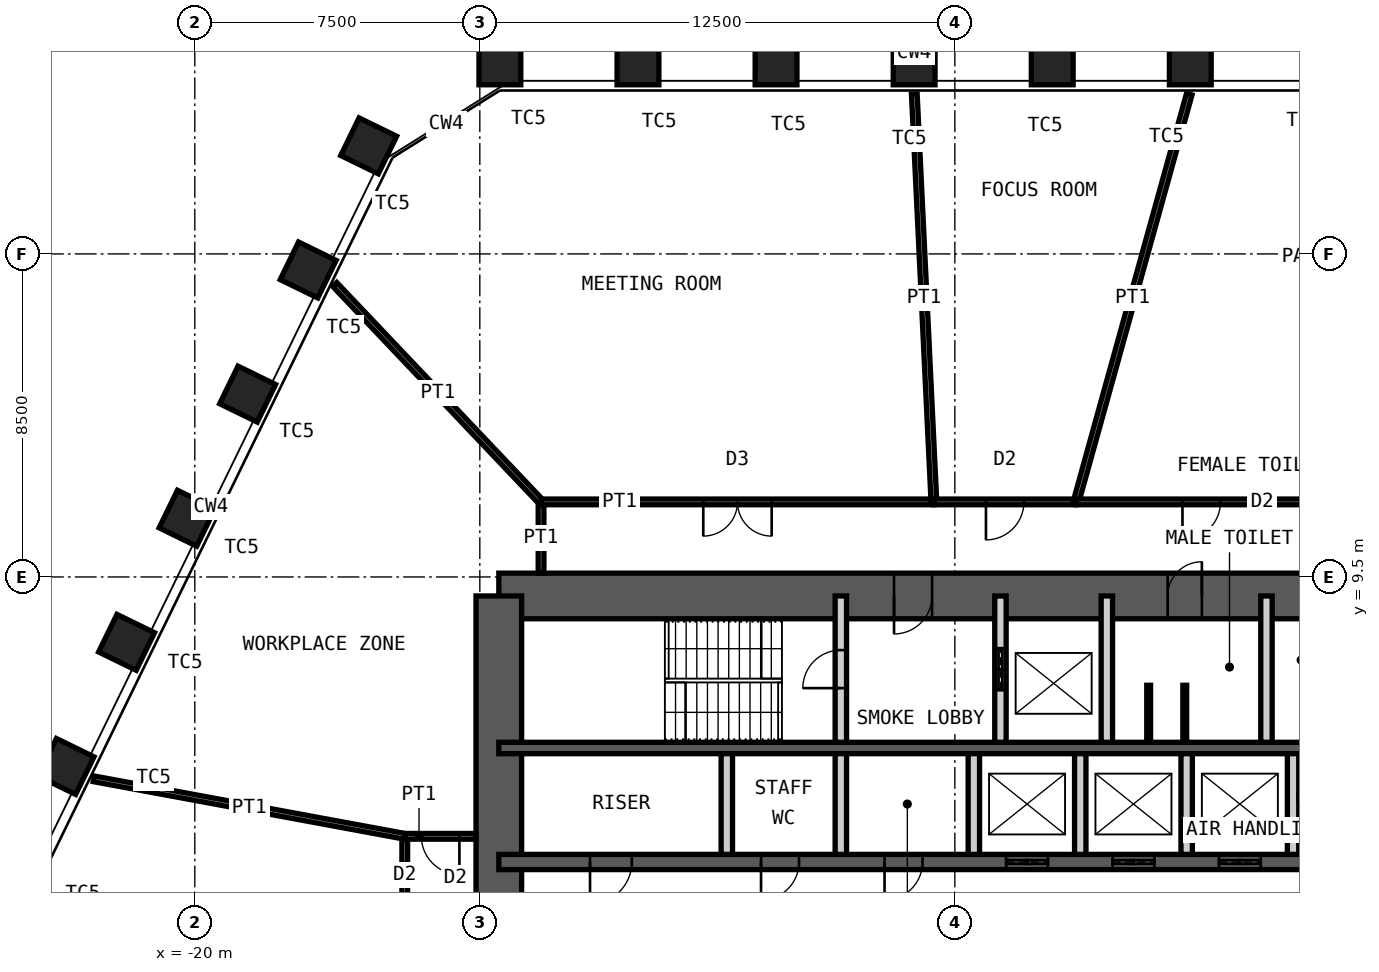
"""IFC4 building model, lengths in metres.
Left out: names, types, materials, properties, quantities, classifications, styles, units other than length and angle.
Written with IfcOpenShell. Run it as: python <this file> out.ifc"""

import sys

from ifc_helpers import new_model, si_unit, direction, frame, frame_2d, origin, origin_2d, place, context, subcontext, project, spatial, rectangle, hollow_rectangle, extrude, element, fill, save


model = new_model("IFC4")
c1 = context("Model", 3, precision=1e-05, world=origin(), true_north=direction((0.0, 1.0)))
c2 = subcontext(c1, "Body", "Model", "MODEL_VIEW")
j1 = project(units=[si_unit("LENGTHUNIT", "METRE"), si_unit("PLANEANGLEUNIT", "RADIAN")], contexts=[c1])
p1 = place(None, origin())
s1 = spatial("IfcSite", under=j1, at=p1, CompositionType="ELEMENT")
p2 = place(p1, origin())
s2 = spatial("IfcBuilding", under=s1, at=p2, CompositionType="ELEMENT")
p3 = place(p2, frame((0.0, 0.0, 205.6)))
s3 = spatial("IfcBuildingStorey", under=s2, at=p3, CompositionType="ELEMENT", Elevation=205.6)
for number, where, z_axis, x_axis in (
    (1, (-11.972, 23.0, 0.0), (0.0, 0.0, 1.0), (-1.0, 0.0, 0.0)),
    (2, (-8.338, 23.0, 0.0), (0.0, 0.0, 1.0), (-1.0, 0.0, 0.0)),
    (3, (-4.705, 23.0, 0.0), (0.0, 0.0, 1.0), (-1.0, 0.0, 0.0)),
    (4, (-1.071, 23.0, 0.0), (0.0, 0.0, 1.0), (-1.0, 0.0, 0.0)),
    (5, (2.562, 23.0, 0.0), (0.0, 0.0, 1.0), (-1.0, 0.0, 0.0)),
    (6, (6.196, 23.0, 0.0), (0.0, 0.0, 1.0), (-1.0, 0.0, 0.0)),
    (7, (-23.388, 4.514, 0.0), (0.0, 0.0, 1.0), (-0.438, -0.899, 0.0)),
    (8, (-21.795, 7.78, 0.0), (0.0, 0.0, 1.0), (-0.438, -0.899, 0.0)),
    (9, (-20.203, 11.045, 0.0), (0.0, 0.0, 1.0), (-0.438, -0.899, 0.0)),
    (10, (-18.61, 14.311, 0.0), (0.0, 0.0, 1.0), (-0.438, -0.899, 0.0)),
    (11, (-17.017, 17.577, 0.0), (0.0, 0.0, 1.0), (-0.438, -0.899, 0.0)),
    (12, (-15.424, 20.843, 0.0), (0.0, 0.0, 1.0), (-0.438, -0.899, 0.0)),
):
    element("IfcColumn", number, at=place(p3, frame(where, z_axis=z_axis, x_axis=x_axis)), inside=s3, PredefinedType="COLUMN", context=c2, shape_type="SweptSolid", body=[
        extrude(hollow_rectangle(XDim=1.1, YDim=1.1, WallThickness=0.07, at=origin_2d()), origin(), (0.0, 0.0, 1.0), 4.2),
    ])
p4 = place(p3, frame((-12.0, 9.0, 0.0), z_axis=(0.0, 0.0, 1.0), x_axis=(1.0, 0.0, 0.0)))
e13 = element("IfcWall", 13, at=p4, inside=s3, PredefinedType="SHEAR", context=c2, shape_type="SweptSolid", body=[
    extrude(rectangle(XDim=24.0, YDim=1.2, at=frame_2d((12.0, 0.0))), origin(), (0.0, 0.0, 1.0), 4.2),
])
p5 = place(p4, frame((10.4, 0.0, 0.0)))
e14 = element("IfcOpeningElement", 14, at=p5, cuts=e13, PredefinedType="OPENING", context=c2, shape_type="SweptSolid", body=[
    extrude(rectangle(XDim=1.0, YDim=2.1, at=frame_2d((0.5, 1.05))), frame((0.0, 0.61, 0.0), z_axis=(0.0, -1.0, 0.0), x_axis=(1.0, 0.0, 0.0)), (0.0, 0.0, 1.0), 1.22),
])
p6 = place(p4, frame((17.6, 0.0, 0.0)))
e15 = element("IfcOpeningElement", 15, at=p6, cuts=e13, PredefinedType="OPENING", context=c2, shape_type="SweptSolid", body=[
    extrude(rectangle(XDim=0.9, YDim=2.1, at=frame_2d((0.45, 1.05))), frame((0.0, 0.61, 0.0), z_axis=(0.0, -1.0, 0.0), x_axis=(1.0, 0.0, 0.0)), (0.0, 0.0, 1.0), 1.22),
])
p7 = place(p4, frame((21.9, 0.0, 0.0)))
e16 = element("IfcOpeningElement", 16, at=p7, cuts=e13, PredefinedType="OPENING", context=c2, shape_type="SweptSolid", body=[
    extrude(rectangle(XDim=0.9, YDim=2.1, at=frame_2d((0.45, 1.05))), frame((0.0, 0.61, 0.0), z_axis=(0.0, -1.0, 0.0), x_axis=(1.0, 0.0, 0.0)), (0.0, 0.0, 1.0), 1.22),
])
p8 = place(p3, frame((-12.0, -9.0, 0.0), z_axis=(0.0, 0.0, 1.0), x_axis=(0.0, 1.0, 0.0)))
e17 = element("IfcWall", 17, at=p8, inside=s3, PredefinedType="SHEAR", context=c2, shape_type="SweptSolid", body=[
    extrude(rectangle(XDim=18.0, YDim=1.2, at=frame_2d((9.0, 0.0))), origin(), (0.0, 0.0, 1.0), 4.2),
])
p9 = place(p8, frame((8.1, 0.0, 0.0)))
e18 = element("IfcOpeningElement", 18, at=p9, cuts=e17, PredefinedType="OPENING", context=c2, shape_type="SweptSolid", body=[
    extrude(rectangle(XDim=1.8, YDim=2.1, at=frame_2d((0.9, 1.05))), frame((0.0, 0.61, 0.0), z_axis=(0.0, -1.0, 0.0), x_axis=(1.0, 0.0, 0.0)), (0.0, 0.0, 1.0), 1.22),
])
p10 = place(p3, frame((-12.0, 5.0, 0.0), z_axis=(0.0, 0.0, 1.0), x_axis=(1.0, 0.0, 0.0)))
e19 = element("IfcWall", 19, at=p10, inside=s3, PredefinedType="SHEAR", context=c2, shape_type="SweptSolid", body=[
    extrude(rectangle(XDim=24.0, YDim=0.3, at=frame_2d((12.0, 0.0))), origin(), (0.0, 0.0, 1.0), 4.2),
])
p11 = place(p3, frame((-12.0, 2.0, 0.0), z_axis=(0.0, 0.0, 1.0), x_axis=(1.0, 0.0, 0.0)))
e20 = element("IfcWall", 20, at=p11, inside=s3, PredefinedType="SHEAR", context=c2, shape_type="SweptSolid", body=[
    extrude(rectangle(XDim=24.0, YDim=0.4, at=frame_2d((12.0, 0.0))), origin(), (0.0, 0.0, 1.0), 4.2),
])
p12 = place(p11, frame((2.4, 0.0, 0.0)))
e21 = element("IfcOpeningElement", 21, at=p12, cuts=e20, PredefinedType="OPENING", context=c2, shape_type="SweptSolid", body=[
    extrude(rectangle(XDim=1.1, YDim=2.1, at=frame_2d((0.55, 1.05))), frame((0.0, 0.21, 0.0), z_axis=(0.0, -1.0, 0.0), x_axis=(1.0, 0.0, 0.0)), (0.0, 0.0, 1.0), 0.42),
])
p13 = place(p11, frame((22.0, 0.0, 0.0)))
e22 = element("IfcOpeningElement", 22, at=p13, cuts=e20, PredefinedType="OPENING", context=c2, shape_type="SweptSolid", body=[
    extrude(rectangle(XDim=1.1, YDim=2.1, at=frame_2d((0.55, 1.05))), frame((0.0, 0.21, 0.0), z_axis=(0.0, -1.0, 0.0), x_axis=(1.0, 0.0, 0.0)), (0.0, 0.0, 1.0), 0.42),
])
p14 = place(p11, frame((10.15, 0.0, 0.0)))
e23 = element("IfcOpeningElement", 23, at=p14, cuts=e20, PredefinedType="OPENING", context=c2, shape_type="SweptSolid", body=[
    extrude(rectangle(XDim=1.0, YDim=2.1, at=frame_2d((0.5, 1.05))), frame((0.0, 0.21, 0.0), z_axis=(0.0, -1.0, 0.0), x_axis=(1.0, 0.0, 0.0)), (0.0, 0.0, 1.0), 0.42),
])
p15 = place(p11, frame((6.9, 0.0, 0.0)))
e24 = element("IfcOpeningElement", 24, at=p15, cuts=e20, PredefinedType="OPENING", context=c2, shape_type="SweptSolid", body=[
    extrude(rectangle(XDim=1.0, YDim=2.1, at=frame_2d((0.5, 1.05))), frame((0.0, 0.21, 0.0), z_axis=(0.0, -1.0, 0.0), x_axis=(1.0, 0.0, 0.0)), (0.0, 0.0, 1.0), 0.42),
])
p16 = place(p11, frame((13.35, 0.0, 0.0)))
e25 = element("IfcOpeningElement", 25, at=p16, cuts=e20, PredefinedType="OPENING", context=c2, shape_type="SweptSolid", body=[
    extrude(rectangle(XDim=1.1, YDim=2.4, at=frame_2d((0.55, 1.2))), frame((0.0, 0.21, 0.0), z_axis=(0.0, -1.0, 0.0), x_axis=(1.0, 0.0, 0.0)), (0.0, 0.0, 1.0), 0.42),
])
p17 = place(p11, frame((16.15, 0.0, 0.0)))
e26 = element("IfcOpeningElement", 26, at=p17, cuts=e20, PredefinedType="OPENING", context=c2, shape_type="SweptSolid", body=[
    extrude(rectangle(XDim=1.1, YDim=2.4, at=frame_2d((0.55, 1.2))), frame((0.0, 0.21, 0.0), z_axis=(0.0, -1.0, 0.0), x_axis=(1.0, 0.0, 0.0)), (0.0, 0.0, 1.0), 0.42),
])
p18 = place(p11, frame((18.95, 0.0, 0.0)))
e27 = element("IfcOpeningElement", 27, at=p18, cuts=e20, PredefinedType="OPENING", context=c2, shape_type="SweptSolid", body=[
    extrude(rectangle(XDim=1.1, YDim=2.4, at=frame_2d((0.55, 1.2))), frame((0.0, 0.21, 0.0), z_axis=(0.0, -1.0, 0.0), x_axis=(1.0, 0.0, 0.0)), (0.0, 0.0, 1.0), 0.42),
])
p19 = place(p3, frame((-3.0, 5.15, 0.0), z_axis=(0.0, 0.0, 1.0), x_axis=(0.0, 1.0, 0.0)))
e28 = element("IfcWall", 28, at=p19, inside=s3, PredefinedType="PARTITIONING", context=c2, shape_type="SweptSolid", body=[
    extrude(rectangle(XDim=3.85, YDim=0.3, at=frame_2d((1.925, 0.0))), origin(), (0.0, 0.0, 1.0), 3.98),
])
p20 = place(p19, frame((1.425, 0.0, 0.0)))
e29 = element("IfcOpeningElement", 29, at=p20, cuts=e28, PredefinedType="OPENING", context=c2, shape_type="SweptSolid", body=[
    extrude(rectangle(XDim=1.0, YDim=2.1, at=frame_2d((0.5, 1.05))), frame((0.0, 0.16, 0.0), z_axis=(0.0, -1.0, 0.0), x_axis=(1.0, 0.0, 0.0)), (0.0, 0.0, 1.0), 0.32),
])
p21 = place(p3, frame((1.2, 5.15, 0.0), z_axis=(0.0, 0.0, 1.0), x_axis=(0.0, 1.0, 0.0)))
e30 = element("IfcWall", 30, at=p21, inside=s3, PredefinedType="PARTITIONING", context=c2, shape_type="SweptSolid", body=[
    extrude(rectangle(XDim=3.85, YDim=0.3, at=frame_2d((1.925, 0.0))), origin(), (0.0, 0.0, 1.0), 3.98),
])
p22 = place(p21, frame((1.375, 0.0, 0.0)))
e31 = element("IfcOpeningElement", 31, at=p22, cuts=e30, PredefinedType="OPENING", context=c2, shape_type="SweptSolid", body=[
    extrude(rectangle(XDim=1.1, YDim=2.4, at=frame_2d((0.55, 1.2))), frame((0.0, 0.16, 0.0), z_axis=(0.0, -1.0, 0.0), x_axis=(1.0, 0.0, 0.0)), (0.0, 0.0, 1.0), 0.32),
])
for number, where, z_axis, x_axis in (
    (32, (4.0, 5.15, 0.0), (0.0, 0.0, 1.0), (0.0, 1.0, 0.0)),
    (33, (8.2, 5.15, 0.0), (0.0, 0.0, 1.0), (0.0, 1.0, 0.0)),
):
    element("IfcWall", number, at=place(p3, frame(where, z_axis=z_axis, x_axis=x_axis)), inside=s3, PredefinedType="PARTITIONING", context=c2, shape_type="SweptSolid", body=[
        extrude(rectangle(XDim=3.85, YDim=0.3, at=frame_2d((1.925, 0.0))), origin(), (0.0, 0.0, 1.0), 3.98),
    ])
for number, where, z_axis, x_axis in (
    (34, (-6.0, 2.2, 0.0), (0.0, 0.0, 1.0), (0.0, 1.0, 0.0)),
    (35, (-3.0, 2.2, 0.0), (0.0, 0.0, 1.0), (0.0, 1.0, 0.0)),
    (36, (0.5, 2.2, 0.0), (0.0, 0.0, 1.0), (0.0, 1.0, 0.0)),
    (37, (3.3, 2.2, 0.0), (0.0, 0.0, 1.0), (0.0, 1.0, 0.0)),
    (38, (6.1, 2.2, 0.0), (0.0, 0.0, 1.0), (0.0, 1.0, 0.0)),
    (39, (8.9, 2.2, 0.0), (0.0, 0.0, 1.0), (0.0, 1.0, 0.0)),
):
    element("IfcWall", number, at=place(p3, frame(where, z_axis=z_axis, x_axis=x_axis)), inside=s3, PredefinedType="PARTITIONING", context=c2, shape_type="SweptSolid", body=[
        extrude(rectangle(XDim=2.65, YDim=0.3, at=frame_2d((1.325, 0.0))), origin(), (0.0, 0.0, 1.0), 3.98),
    ])
p23 = place(p3, frame((9.05, 3.7, 0.0), z_axis=(0.0, 0.0, 1.0), x_axis=(1.0, 0.0, 0.0)))
e40 = element("IfcWall", 40, at=p23, inside=s3, PredefinedType="PARTITIONING", context=c2, shape_type="SweptSolid", body=[
    extrude(rectangle(XDim=2.35, YDim=0.1, at=frame_2d((1.175, 0.0))), origin(), (0.0, 0.0, 1.0), 3.98),
])
p24 = place(p23, frame((0.1, 0.0, 0.0)))
e41 = element("IfcOpeningElement", 41, at=p24, cuts=e40, PredefinedType="OPENING", context=c2, shape_type="SweptSolid", body=[
    extrude(rectangle(XDim=1.0, YDim=2.4, at=frame_2d((0.5, 1.2))), frame((0.0, 0.06, 0.0), z_axis=(0.0, -1.0, 0.0), x_axis=(1.0, 0.0, 0.0)), (0.0, 0.0, 1.0), 0.12),
])
for number, where, z_axis, x_axis in (
    (42, (5.1, 5.15, 0.0), (0.0, 0.0, 1.0), (0.0, 1.0, 0.0)),
    (43, (6.05, 5.15, 0.0), (0.0, 0.0, 1.0), (0.0, 1.0, 0.0)),
):
    element("IfcWall", number, at=place(p3, frame(where, z_axis=z_axis, x_axis=x_axis)), inside=s3, PredefinedType="PARTITIONING", context=c2, shape_type="SweptSolid", body=[
        extrude(rectangle(XDim=1.5, YDim=0.1, at=frame_2d((0.75, 0.0))), origin(), (0.0, 0.0, 1.0), 2.1),
    ])
p25 = place(p3, frame((-14.475, -1.576, 0.0), z_axis=(0.0, 0.0, 1.0), x_axis=(0.0, 1.0, 0.0)))
e44 = element("IfcWall", 44, at=p25, inside=s3, PredefinedType="PARTITIONING", context=c2, shape_type="SweptSolid", body=[
    extrude(rectangle(XDim=4.252, YDim=0.15, at=frame_2d((2.126, 0.0))), origin(), (0.0, 0.0, 1.0), 4.03),
])
p26 = place(p25, frame((1.626, 0.0, 0.0)))
e45 = element("IfcOpeningElement", 45, at=p26, cuts=e44, PredefinedType="OPENING", context=c2, shape_type="SweptSolid", body=[
    extrude(rectangle(XDim=1.0, YDim=2.4, at=frame_2d((0.5, 1.2))), frame((0.0, 0.085, 0.0), z_axis=(0.0, -1.0, 0.0), x_axis=(1.0, 0.0, 0.0)), (0.0, 0.0, 1.0), 0.17),
])
p27 = place(p3, frame((-22.661, 4.189, 0.0), z_axis=(0.0, 0.0, 1.0), x_axis=(0.983345347199, -0.181746879316, 0.0)))
e46 = element("IfcWall", 46, at=p27, inside=s3, PredefinedType="PARTITIONING", context=c2, shape_type="SweptSolid", body=[
    extrude(rectangle(XDim=8.324, YDim=0.15, at=frame_2d((4.162, 0.0))), origin(), (0.0, 0.0, 1.0), 3.43),
])
p28 = place(p3, frame((-14.475, 2.676, 0.0), z_axis=(0.0, 0.0, 1.0), x_axis=(1.0, 0.0, 0.0)))
e47 = element("IfcWall", 47, at=p28, inside=s3, PredefinedType="PARTITIONING", context=c2, shape_type="SweptSolid", body=[
    extrude(rectangle(XDim=1.875, YDim=0.15, at=frame_2d((0.938, 0.0))), origin(), (0.0, 0.0, 1.0), 3.43),
])
p29 = place(p28, frame((0.438, 0.0, 0.0)))
e48 = element("IfcOpeningElement", 48, at=p29, cuts=e47, PredefinedType="OPENING", context=c2, shape_type="SweptSolid", body=[
    extrude(rectangle(XDim=1.0, YDim=2.4, at=frame_2d((0.5, 1.2))), frame((0.0, 0.085, 0.0), z_axis=(0.0, -1.0, 0.0), x_axis=(1.0, 0.0, 0.0)), (0.0, 0.0, 1.0), 0.17),
])
p30 = place(p3, frame((-10.889, 9.6, 0.0), z_axis=(0.0, 0.0, 1.0), x_axis=(0.0, 1.0, 0.0)))
e49 = element("IfcWall", 49, at=p30, inside=s3, PredefinedType="PARTITIONING", context=c2, shape_type="SweptSolid", body=[
    extrude(rectangle(XDim=1.875, YDim=0.15, at=frame_2d((0.938, 0.0))), origin(), (0.0, 0.0, 1.0), 4.03),
])
p31 = place(p3, frame((-16.319, 17.198, 0.0), z_axis=(0.0, 0.0, 1.0), x_axis=(0.688326413955, -0.725401094466, 0.0)))
e50 = element("IfcWall", 50, at=p31, inside=s3, PredefinedType="PARTITIONING", context=c2, shape_type="SweptSolid", body=[
    extrude(rectangle(XDim=7.889, YDim=0.15, at=frame_2d((3.944, 0.0))), origin(), (0.0, 0.0, 1.0), 4.03),
])
p32 = place(p3, frame((-10.889, 11.475, 0.0), z_axis=(0.0, 0.0, 1.0), x_axis=(1.0, 0.0, 0.0)))
e51 = element("IfcWall", 51, at=p32, inside=s3, PredefinedType="PARTITIONING", context=c2, shape_type="SweptSolid", body=[
    extrude(rectangle(XDim=10.337, YDim=0.15, at=frame_2d((5.169, 0.0))), origin(), (0.0, 0.0, 1.0), 4.03),
])
p33 = place(p32, frame((4.269, 0.0, 0.0)))
e52 = element("IfcOpeningElement", 52, at=p33, cuts=e51, PredefinedType="OPENING", context=c2, shape_type="SweptSolid", body=[
    extrude(rectangle(XDim=1.8, YDim=2.4, at=frame_2d((0.9, 1.2))), frame((0.0, 0.085, 0.0), z_axis=(0.0, -1.0, 0.0), x_axis=(1.0, 0.0, 0.0)), (0.0, 0.0, 1.0), 0.17),
])
p34 = place(p3, frame((-1.067, 22.2, 0.0), z_axis=(0.0, 0.0, 1.0), x_axis=(0.047998335863, -0.998847415652, 0.0)))
e53 = element("IfcWall", 53, at=p34, inside=s3, PredefinedType="PARTITIONING", context=c2, shape_type="SweptSolid", body=[
    extrude(rectangle(XDim=10.738, YDim=0.15, at=frame_2d((5.369, 0.0))), origin(), (0.0, 0.0, 1.0), 3.43),
])
p35 = place(p3, frame((-0.551, 11.475, 0.0), z_axis=(0.0, 0.0, 1.0), x_axis=(1.0, 0.0, 0.0)))
e54 = element("IfcWall", 54, at=p35, inside=s3, PredefinedType="PARTITIONING", context=c2, shape_type="SweptSolid", body=[
    extrude(rectangle(XDim=3.74, YDim=0.15, at=frame_2d((1.87, 0.0))), origin(), (0.0, 0.0, 1.0), 4.03),
])
p36 = place(p35, frame((1.37, 0.0, 0.0)))
e55 = element("IfcOpeningElement", 55, at=p36, cuts=e54, PredefinedType="OPENING", context=c2, shape_type="SweptSolid", body=[
    extrude(rectangle(XDim=1.0, YDim=2.4, at=frame_2d((0.5, 1.2))), frame((0.0, 0.085, 0.0), z_axis=(0.0, -1.0, 0.0), x_axis=(1.0, 0.0, 0.0)), (0.0, 0.0, 1.0), 0.17),
])
p37 = place(p3, frame((6.169, 22.204, 0.0), z_axis=(0.0, 0.0, 1.0), x_axis=(-0.26769135876, -0.963504715321, 0.0)))
e56 = element("IfcWall", 56, at=p37, inside=s3, PredefinedType="PARTITIONING", context=c2, shape_type="SweptSolid", body=[
    extrude(rectangle(XDim=11.135, YDim=0.15, at=frame_2d((5.567, 0.0))), origin(), (0.0, 0.0, 1.0), 3.43),
])
p38 = place(p3, frame((3.188, 11.475, 0.0), z_axis=(0.0, 0.0, 1.0), x_axis=(1.0, 0.0, 0.0)))
e57 = element("IfcWall", 57, at=p38, inside=s3, PredefinedType="PARTITIONING", context=c2, shape_type="SweptSolid", body=[
    extrude(rectangle(XDim=6.603, YDim=0.15, at=frame_2d((3.301, 0.0))), origin(), (0.0, 0.0, 1.0), 4.03),
])
p39 = place(p38, frame((2.802, 0.0, 0.0)))
e58 = element("IfcOpeningElement", 58, at=p39, cuts=e57, PredefinedType="OPENING", context=c2, shape_type="SweptSolid", body=[
    extrude(rectangle(XDim=1.0, YDim=2.4, at=frame_2d((0.5, 1.2))), frame((0.0, 0.085, 0.0), z_axis=(0.0, -1.0, 0.0), x_axis=(1.0, 0.0, 0.0)), (0.0, 0.0, 1.0), 0.17),
])
p40 = place(p5, origin())
e59 = element("IfcDoor", 59, at=p40, inside=s3, OperationType="SINGLE_SWING_LEFT", PredefinedType="DOOR", context=c2, shape_type="SweptSolid", body=[
    extrude(rectangle(XDim=1.0, YDim=2.1, at=frame_2d((0.5, 1.05))), frame((0.0, 0.025, 0.0), z_axis=(0.0, -1.0, 0.0), x_axis=(1.0, 0.0, 0.0)), (0.0, 0.0, 1.0), 0.05),
])
fill(e14, e59)
p41 = place(p6, origin())
e60 = element("IfcDoor", 60, at=p41, inside=s3, OperationType="SINGLE_SWING_LEFT", PredefinedType="DOOR", context=c2, shape_type="SweptSolid", body=[
    extrude(rectangle(XDim=0.9, YDim=2.1, at=frame_2d((0.45, 1.05))), frame((0.0, 0.025, 0.0), z_axis=(0.0, -1.0, 0.0), x_axis=(1.0, 0.0, 0.0)), (0.0, 0.0, 1.0), 0.05),
])
fill(e15, e60)
p42 = place(p20, origin())
e61 = element("IfcDoor", 61, at=p42, inside=s3, OperationType="SINGLE_SWING_RIGHT", PredefinedType="DOOR", context=c2, shape_type="SweptSolid", body=[
    extrude(rectangle(XDim=1.0, YDim=2.1, at=frame_2d((0.5, 1.05))), frame((0.0, 0.025, 0.0), z_axis=(0.0, -1.0, 0.0), x_axis=(1.0, 0.0, 0.0)), (0.0, 0.0, 1.0), 0.05),
])
fill(e29, e61)
p43 = place(p12, origin())
e62 = element("IfcDoor", 62, at=p43, inside=s3, OperationType="SINGLE_SWING_LEFT", PredefinedType="DOOR", context=c2, shape_type="SweptSolid", body=[
    extrude(rectangle(XDim=1.1, YDim=2.1, at=frame_2d((0.55, 1.05))), frame((0.0, 0.025, 0.0), z_axis=(0.0, -1.0, 0.0), x_axis=(1.0, 0.0, 0.0)), (0.0, 0.0, 1.0), 0.05),
])
fill(e21, e62)
p44 = place(p14, origin())
e63 = element("IfcDoor", 63, at=p44, inside=s3, OperationType="SINGLE_SWING_LEFT", PredefinedType="DOOR", context=c2, shape_type="SweptSolid", body=[
    extrude(rectangle(XDim=1.0, YDim=2.1, at=frame_2d((0.5, 1.05))), frame((0.0, 0.025, 0.0), z_axis=(0.0, -1.0, 0.0), x_axis=(1.0, 0.0, 0.0)), (0.0, 0.0, 1.0), 0.05),
])
fill(e23, e63)
p45 = place(p22, origin())
e64 = element("IfcDoor", 64, at=p45, inside=s3, OperationType="DOUBLE_DOOR_SLIDING", PredefinedType="DOOR", context=c2, shape_type="SweptSolid", body=[
    extrude(rectangle(XDim=1.1, YDim=2.4, at=frame_2d((0.55, 1.2))), frame((0.0, 0.025, 0.0), z_axis=(0.0, -1.0, 0.0), x_axis=(1.0, 0.0, 0.0)), (0.0, 0.0, 1.0), 0.05),
])
fill(e31, e64)
p46 = place(p15, origin())
e65 = element("IfcDoor", 65, at=p46, inside=s3, OperationType="SINGLE_SWING_LEFT", PredefinedType="DOOR", context=c2, shape_type="SweptSolid", body=[
    extrude(rectangle(XDim=1.0, YDim=2.1, at=frame_2d((0.5, 1.05))), frame((0.0, 0.025, 0.0), z_axis=(0.0, -1.0, 0.0), x_axis=(1.0, 0.0, 0.0)), (0.0, 0.0, 1.0), 0.05),
])
fill(e24, e65)
p47 = place(p16, origin())
e66 = element("IfcDoor", 66, at=p47, inside=s3, OperationType="DOUBLE_DOOR_SLIDING", PredefinedType="DOOR", context=c2, shape_type="SweptSolid", body=[
    extrude(rectangle(XDim=1.1, YDim=2.4, at=frame_2d((0.55, 1.2))), frame((0.0, 0.025, 0.0), z_axis=(0.0, -1.0, 0.0), x_axis=(1.0, 0.0, 0.0)), (0.0, 0.0, 1.0), 0.05),
])
fill(e25, e66)
p48 = place(p17, origin())
e67 = element("IfcDoor", 67, at=p48, inside=s3, OperationType="DOUBLE_DOOR_SLIDING", PredefinedType="DOOR", context=c2, shape_type="SweptSolid", body=[
    extrude(rectangle(XDim=1.1, YDim=2.4, at=frame_2d((0.55, 1.2))), frame((0.0, 0.025, 0.0), z_axis=(0.0, -1.0, 0.0), x_axis=(1.0, 0.0, 0.0)), (0.0, 0.0, 1.0), 0.05),
])
fill(e26, e67)
p49 = place(p18, origin())
e68 = element("IfcDoor", 68, at=p49, inside=s3, OperationType="DOUBLE_DOOR_SLIDING", PredefinedType="DOOR", context=c2, shape_type="SweptSolid", body=[
    extrude(rectangle(XDim=1.1, YDim=2.4, at=frame_2d((0.55, 1.2))), frame((0.0, 0.025, 0.0), z_axis=(0.0, -1.0, 0.0), x_axis=(1.0, 0.0, 0.0)), (0.0, 0.0, 1.0), 0.05),
])
fill(e27, e68)
p50 = place(p29, origin())
e69 = element("IfcDoor", 69, at=p50, inside=s3, OperationType="SINGLE_SWING_RIGHT", PredefinedType="DOOR", context=c2, shape_type="SweptSolid", body=[
    extrude(rectangle(XDim=1.0, YDim=2.4, at=frame_2d((0.5, 1.2))), frame((0.0, 0.025, 0.0), z_axis=(0.0, -1.0, 0.0), x_axis=(1.0, 0.0, 0.0)), (0.0, 0.0, 1.0), 0.05),
])
fill(e48, e69)
p51 = place(p33, origin())
e70 = element("IfcDoor", 70, at=p51, inside=s3, OperationType="DOUBLE_DOOR_DOUBLE_SWING", PredefinedType="DOOR", context=c2, shape_type="SweptSolid", body=[
    extrude(rectangle(XDim=1.8, YDim=2.4, at=frame_2d((0.9, 1.2))), frame((0.0, 0.025, 0.0), z_axis=(0.0, -1.0, 0.0), x_axis=(1.0, 0.0, 0.0)), (0.0, 0.0, 1.0), 0.05),
])
fill(e52, e70)
p52 = place(p36, origin())
e71 = element("IfcDoor", 71, at=p52, inside=s3, OperationType="SINGLE_SWING_LEFT", PredefinedType="DOOR", context=c2, shape_type="SweptSolid", body=[
    extrude(rectangle(XDim=1.0, YDim=2.4, at=frame_2d((0.5, 1.2))), frame((0.0, 0.025, 0.0), z_axis=(0.0, -1.0, 0.0), x_axis=(1.0, 0.0, 0.0)), (0.0, 0.0, 1.0), 0.05),
])
fill(e55, e71)
p53 = place(p39, origin())
e72 = element("IfcDoor", 72, at=p53, inside=s3, OperationType="SINGLE_SWING_LEFT", PredefinedType="DOOR", context=c2, shape_type="SweptSolid", body=[
    extrude(rectangle(XDim=1.0, YDim=2.4, at=frame_2d((0.5, 1.2))), frame((0.0, 0.025, 0.0), z_axis=(0.0, -1.0, 0.0), x_axis=(1.0, 0.0, 0.0)), (0.0, 0.0, 1.0), 0.05),
])
fill(e58, e72)
save(model, sys.argv[1])
